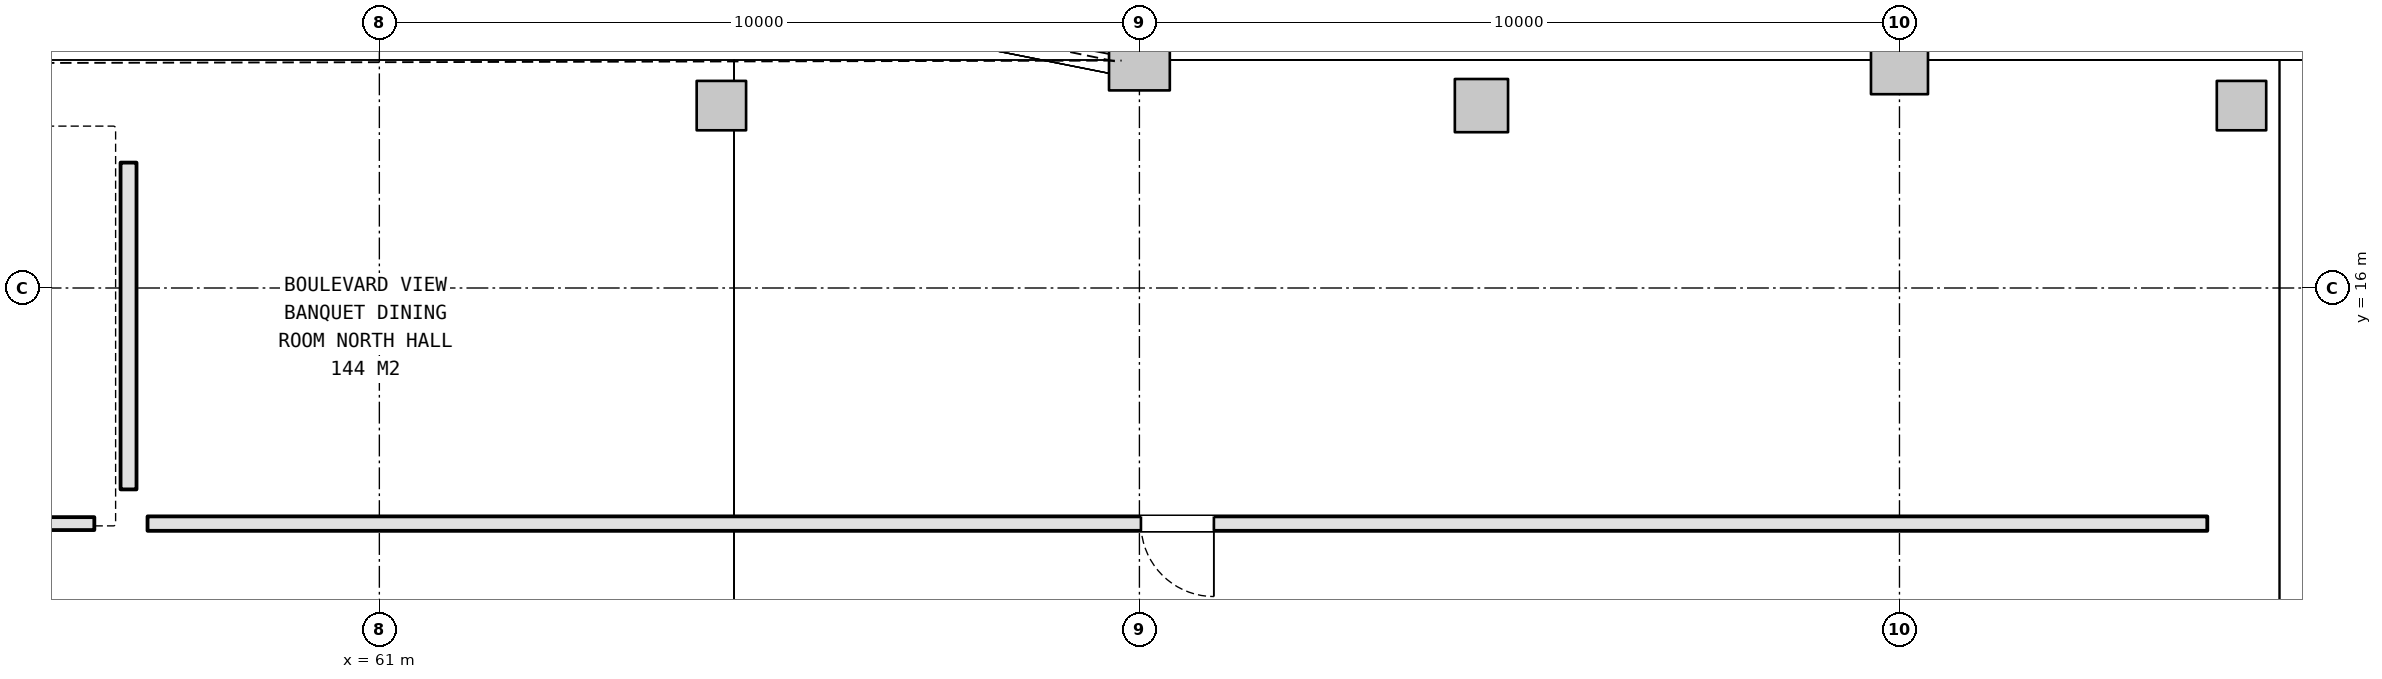
"""IFC4 building model, lengths in metres.
Left out: names, types, materials, properties, quantities, classifications, styles, units other than length and angle.
Written with IfcOpenShell. Run it as: python <this file> out.ifc"""

import sys

from ifc_helpers import new_model, si_unit, direction, frame, frame_2d, origin, origin_2d, place, context, subcontext, project, spatial, rectangle, extrude, element, fill, save


model = new_model("IFC4")
c1 = context("Model", 3, precision=1e-05, world=origin(), true_north=direction((0.0, 1.0)))
c2 = subcontext(c1, "Body", "Model", "MODEL_VIEW")
j1 = project(units=[si_unit("LENGTHUNIT", "METRE"), si_unit("PLANEANGLEUNIT", "RADIAN")], contexts=[c1])
p1 = place(None, origin())
s1 = spatial("IfcSite", under=j1, at=p1, CompositionType="ELEMENT")
p2 = place(p1, origin())
s2 = spatial("IfcBuilding", under=s1, at=p2, CompositionType="ELEMENT")
p3 = place(p2, frame((0.0, 0.0, 10.8)))
s3 = spatial("IfcBuildingStorey", under=s2, at=p3, CompositionType="ELEMENT", Elevation=10.8)
p4 = place(p3, frame((71.0, 19.0, 0.0), z_axis=(0.0, 0.0, 1.0), x_axis=(1.0, 0.0, 0.0)))
e1 = element("IfcColumn", 1, at=p4, inside=s3, PredefinedType="COLUMN", context=c2, shape_type="SweptSolid", body=[
    extrude(rectangle(XDim=0.8, YDim=0.8, at=origin_2d()), origin(), (0.0, 0.0, 1.0), 5.4),
])
p5 = place(p3, frame((81.0, 19.0, 0.0), z_axis=(0.0, 0.0, 1.0), x_axis=(1.0, 0.0, 0.0)))
e2 = element("IfcColumn", 2, at=p5, inside=s3, PredefinedType="COLUMN", context=c2, shape_type="SweptSolid", body=[
    extrude(rectangle(XDim=0.75, YDim=0.9, at=origin_2d()), origin(), (0.0, 0.0, 1.0), 5.4),
])
p6 = place(p3, frame((65.5, 18.4, 0.0), z_axis=(0.0, 0.0, 1.0), x_axis=(1.0, 0.0, 0.0)))
e3 = element("IfcColumn", 3, at=p6, inside=s3, PredefinedType="COLUMN", context=c2, shape_type="SweptSolid", body=[
    extrude(rectangle(XDim=0.65, YDim=0.65, at=origin_2d()), origin(), (0.0, 0.0, 1.0), 5.4),
])
p7 = place(p3, frame((75.5, 18.4, 0.0), z_axis=(0.0, 0.0, 1.0), x_axis=(1.0, 0.0, 0.0)))
e4 = element("IfcColumn", 4, at=p7, inside=s3, PredefinedType="COLUMN", context=c2, shape_type="SweptSolid", body=[
    extrude(rectangle(XDim=0.7, YDim=0.7, at=origin_2d()), origin(), (0.0, 0.0, 1.0), 5.4),
])
p8 = place(p3, frame((85.5, 18.4, 0.0), z_axis=(0.0, 0.0, 1.0), x_axis=(1.0, 0.0, 0.0)))
e5 = element("IfcColumn", 5, at=p8, inside=s3, PredefinedType="COLUMN", context=c2, shape_type="SweptSolid", body=[
    extrude(rectangle(XDim=0.65, YDim=0.65, at=origin_2d()), origin(), (0.0, 0.0, 1.0), 5.4),
])
p9 = place(p3, frame((57.25, 12.9, 0.0), z_axis=(0.0, 0.0, 1.0), x_axis=(-1.0, 0.0, 0.0)))
e6 = element("IfcWall", 6, at=p9, inside=s3, PredefinedType="PARTITIONING", context=c2, shape_type="SweptSolid", body=[
    extrude(rectangle(XDim=31.3, YDim=0.17, at=frame_2d((15.65, 0.0))), origin(), (0.0, 0.0, 1.0), 4.435),
])
p10 = place(p9, frame((15.025, 0.0, 0.0)))
e7 = element("IfcOpeningElement", 7, at=p10, cuts=e6, PredefinedType="OPENING", context=c2, shape_type="SweptSolid", body=[
    extrude(rectangle(XDim=1.25, YDim=2.2, at=frame_2d((0.625, 1.1))), frame((0.0, 0.095, 0.0), z_axis=(0.0, -1.0, 0.0), x_axis=(1.0, 0.0, 0.0)), (0.0, 0.0, 1.0), 0.19),
])
p11 = place(p3, frame((85.05, 12.9, 0.0), z_axis=(0.0, 0.0, 1.0), x_axis=(-1.0, 0.0, 0.0)))
e8 = element("IfcWall", 8, at=p11, inside=s3, PredefinedType="PARTITIONING", context=c2, shape_type="SweptSolid", body=[
    extrude(rectangle(XDim=27.1, YDim=0.19, at=frame_2d((13.55, 0.0))), origin(), (0.0, 0.0, 1.0), 4.435),
])
p12 = place(p11, frame((13.07, 0.0, 0.0)))
e9 = element("IfcOpeningElement", 9, at=p12, cuts=e8, PredefinedType="OPENING", context=c2, shape_type="SweptSolid", body=[
    extrude(rectangle(XDim=0.96, YDim=2.15, at=frame_2d((0.48, 1.075))), frame((0.0, 0.105, 0.0), z_axis=(0.0, -1.0, 0.0), x_axis=(1.0, 0.0, 0.0)), (0.0, 0.0, 1.0), 0.21),
])
p13 = place(p3, frame((57.7, 13.35, 0.0), z_axis=(0.0, 0.0, 1.0), x_axis=(0.0, 1.0, 0.0)))
e10 = element("IfcWall", 10, at=p13, inside=s3, PredefinedType="PLUMBINGWALL", context=c2, shape_type="SweptSolid", body=[
    extrude(rectangle(XDim=4.3, YDim=0.21, at=frame_2d((2.15, 0.0))), origin(), (0.0, 0.0, 1.0), 4.635),
])
p14 = place(p12, origin())
e11 = element("IfcDoor", 11, at=p14, inside=s3, OperationType="SINGLE_SWING_LEFT", PredefinedType="DOOR", context=c2, shape_type="SweptSolid", body=[
    extrude(rectangle(XDim=0.96, YDim=2.15, at=frame_2d((0.48, 1.075))), frame((0.0, 0.025, 0.0), z_axis=(0.0, -1.0, 0.0), x_axis=(1.0, 0.0, 0.0)), (0.0, 0.0, 1.0), 0.05),
])
fill(e9, e11)
save(model, sys.argv[1])
